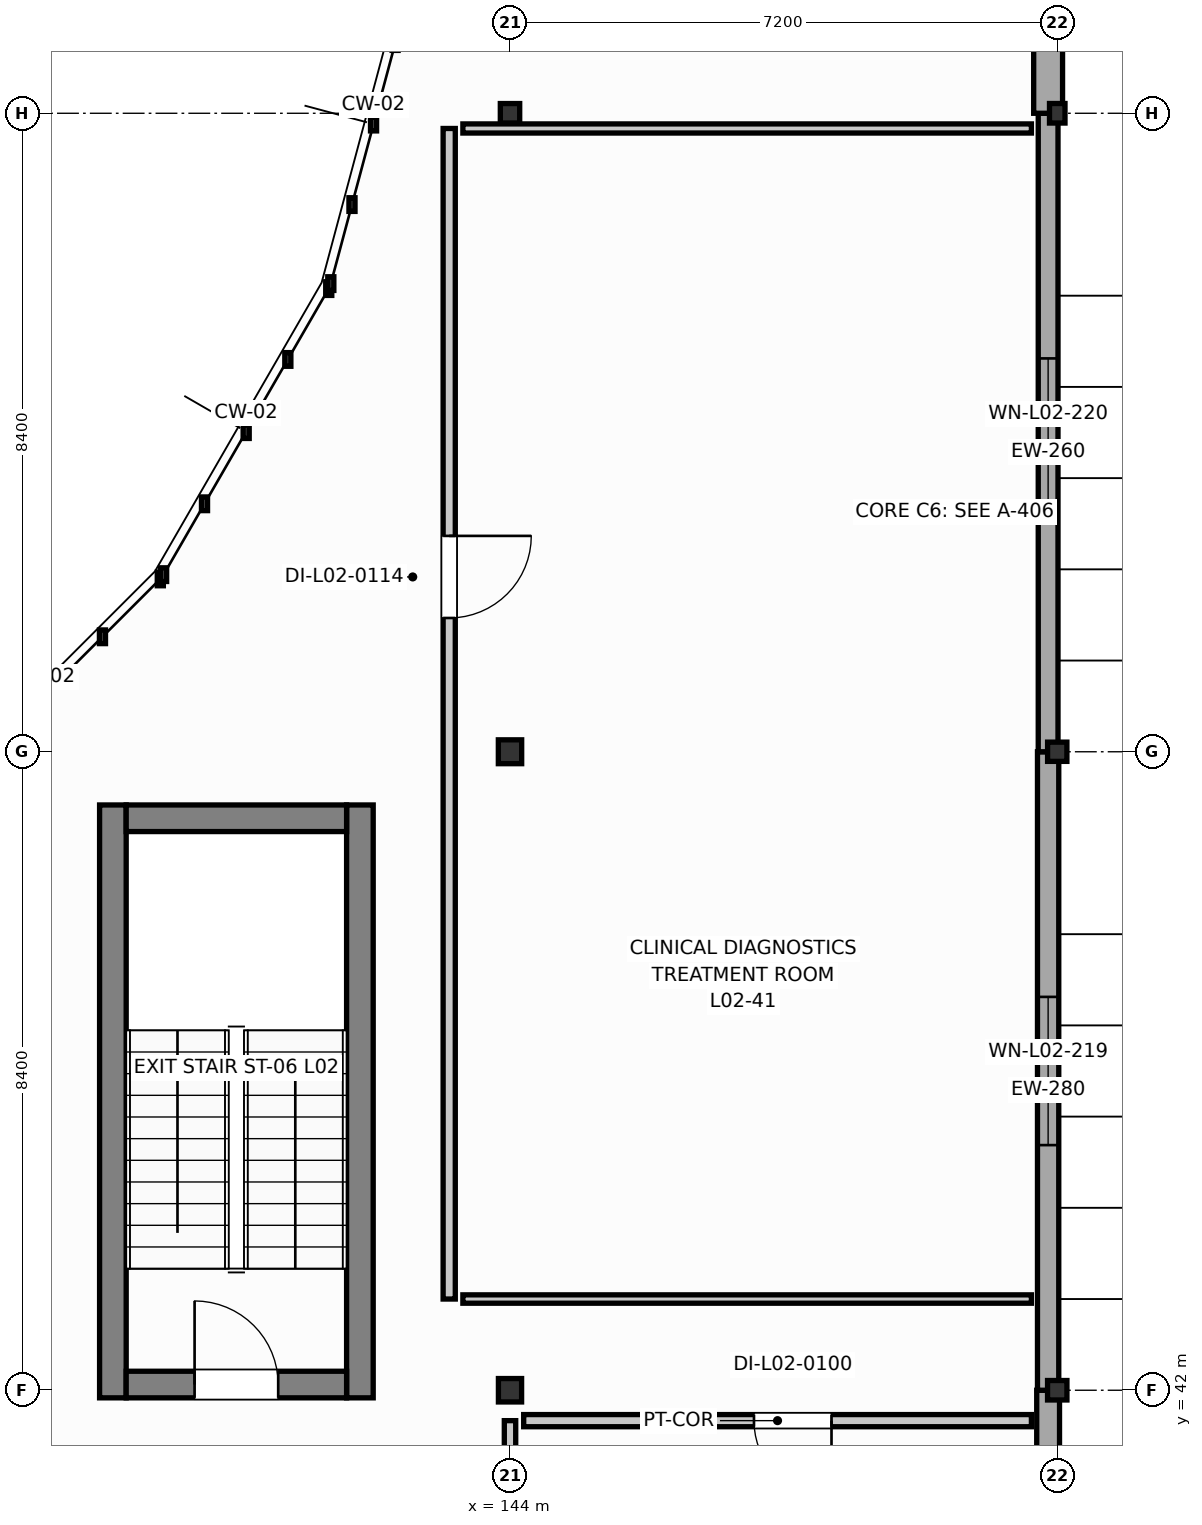
"""IFC4 building model, lengths in metres.
Left out: names, types, materials, properties, quantities, classifications, styles, units other than length and angle.
Written with IfcOpenShell. Run it as: python <this file> out.ifc"""

import sys

from ifc_helpers import new_model, si_unit, direction, frame, frame_2d, origin, origin_2d, place, context, subcontext, project, spatial, rectangle, i_section, extrude, element, fill, save


model = new_model("IFC4")
c1 = context("Model", 3, precision=1e-05, world=origin(), true_north=direction((0.0, 1.0)))
c2 = subcontext(c1, "Body", "Model", "MODEL_VIEW")
j1 = project(units=[si_unit("LENGTHUNIT", "METRE"), si_unit("PLANEANGLEUNIT", "RADIAN")], contexts=[c1])
p1 = place(None, origin())
s1 = spatial("IfcSite", under=j1, at=p1, CompositionType="ELEMENT")
p2 = place(p1, origin())
s2 = spatial("IfcBuilding", under=s1, at=p2, CompositionType="ELEMENT")
p3 = place(p2, frame((0.0, 0.0, 9.0)))
s3 = spatial("IfcBuildingStorey", under=s2, at=p3, CompositionType="ELEMENT", Elevation=9.0)
p4 = place(p3, frame((144.0, 42.0, 0.0), z_axis=(0.0, 0.0, 1.0), x_axis=(1.0, 0.0, 0.0)))
e1 = element("IfcColumn", 1, at=p4, inside=s3, PredefinedType="COLUMN", context=c2, shape_type="SweptSolid", body=[
    extrude(i_section(OverallWidth=0.305, OverallDepth=0.308, WebThickness=0.01, FlangeThickness=0.015, FilletRadius=0.015, at=origin_2d()), origin(), (0.0, 0.0, 1.0), 4.2),
])
p5 = place(p3, frame((144.0, 50.4, 0.0), z_axis=(0.0, 0.0, 1.0), x_axis=(1.0, 0.0, 0.0)))
e2 = element("IfcColumn", 2, at=p5, inside=s3, PredefinedType="COLUMN", context=c2, shape_type="SweptSolid", body=[
    extrude(i_section(OverallWidth=0.307, OverallDepth=0.314, WebThickness=0.012, FlangeThickness=0.019, FilletRadius=0.016, at=origin_2d()), origin(), (0.0, 0.0, 1.0), 4.2),
])
for number, where, z_axis, x_axis in (
    (3, (144.0, 58.8, 0.0), (0.0, 0.0, 1.0), (1.0, 0.0, 0.0)),
    (4, (151.2, 42.0, 0.0), (0.0, 0.0, 1.0), (1.0, 0.0, 0.0)),
):
    element("IfcColumn", number, at=place(p3, frame(where, z_axis=z_axis, x_axis=x_axis)), inside=s3, PredefinedType="COLUMN", context=c2, shape_type="SweptSolid", body=[
        extrude(i_section(OverallWidth=0.255, OverallDepth=0.256, WebThickness=0.01, FlangeThickness=0.016, FilletRadius=0.013, at=origin_2d()), origin(), (0.0, 0.0, 1.0), 4.2),
    ])
p6 = place(p3, frame((151.2, 50.4, 0.0), z_axis=(0.0, 0.0, 1.0), x_axis=(1.0, 0.0, 0.0)))
e5 = element("IfcColumn", 5, at=p6, inside=s3, PredefinedType="COLUMN", context=c2, shape_type="SweptSolid", body=[
    extrude(i_section(OverallWidth=0.254, OverallDepth=0.253, WebThickness=0.009, FlangeThickness=0.014, FilletRadius=0.013, at=origin_2d()), origin(), (0.0, 0.0, 1.0), 4.2),
])
p7 = place(p3, frame((151.2, 58.8, 0.0), z_axis=(0.0, 0.0, 1.0), x_axis=(1.0, 0.0, 0.0)))
e6 = element("IfcColumn", 6, at=p7, inside=s3, PredefinedType="COLUMN", context=c2, shape_type="SweptSolid", body=[
    extrude(i_section(OverallWidth=0.204, OverallDepth=0.257, WebThickness=0.009, FlangeThickness=0.016, FilletRadius=0.013, at=origin_2d()), origin(), (0.0, 0.0, 1.0), 4.2),
])
for number, where, z_axis, x_axis in (
    (7, (138.775, 41.9, 0.0), (0.0, 0.0, 1.0), (0.0, 1.0, 0.0)),
    (8, (142.025, 41.9, 0.0), (0.0, 0.0, 1.0), (0.0, 1.0, 0.0)),
):
    element("IfcWall", number, at=place(p3, frame(where, z_axis=z_axis, x_axis=x_axis)), inside=s3, PredefinedType="SHEAR", context=c2, shape_type="SweptSolid", body=[
        extrude(rectangle(XDim=7.8, YDim=0.35, at=frame_2d((3.9, 0.0))), origin(), (0.0, 0.0, 1.0), 3.99),
    ])
p8 = place(p3, frame((138.95, 49.525, 0.0), z_axis=(0.0, 0.0, 1.0), x_axis=(1.0, 0.0, 0.0)))
e9 = element("IfcWall", 9, at=p8, inside=s3, PredefinedType="SHEAR", context=c2, shape_type="SweptSolid", body=[
    extrude(rectangle(XDim=2.9, YDim=0.35, at=frame_2d((1.45, 0.0))), origin(), (0.0, 0.0, 1.0), 3.99),
])
p9 = place(p3, frame((138.95, 42.075, 0.0), z_axis=(0.0, 0.0, 1.0), x_axis=(1.0, 0.0, 0.0)))
e10 = element("IfcWall", 10, at=p9, inside=s3, PredefinedType="SHEAR", context=c2, shape_type="SweptSolid", body=[
    extrude(rectangle(XDim=2.9, YDim=0.35, at=frame_2d((1.45, 0.0))), origin(), (0.0, 0.0, 1.0), 3.99),
])
p10 = place(p9, frame((0.9, 0.0, 0.0)))
e11 = element("IfcOpeningElement", 11, at=p10, cuts=e10, PredefinedType="OPENING", context=c2, shape_type="SweptSolid", body=[
    extrude(rectangle(XDim=1.1, YDim=2.15, at=frame_2d((0.55, 1.075))), frame((0.0, 0.185, 0.0), z_axis=(0.0, -1.0, 0.0), x_axis=(1.0, 0.0, 0.0)), (0.0, 0.0, 1.0), 0.37),
])
p11 = place(p3, frame((151.08, 33.6, 0.0), z_axis=(0.0, 0.0, 1.0), x_axis=(0.0, 1.0, 0.0)))
e12 = element("IfcWall", 12, at=p11, inside=s3, PredefinedType="SOLIDWALL", context=c2, shape_type="SweptSolid", body=[
    extrude(rectangle(XDim=8.4, YDim=0.3, at=frame_2d((4.2, 0.0))), origin(), (0.0, 0.0, 1.0), 3.325),
])
p12 = place(p11, frame((3.225, 0.0, 0.95)))
e13 = element("IfcOpeningElement", 13, at=p12, cuts=e12, PredefinedType="OPENING", context=c2, shape_type="SweptSolid", body=[
    extrude(rectangle(XDim=1.95, YDim=1.35, at=frame_2d((0.975, 0.675))), frame((0.0, 0.16, 0.0), z_axis=(0.0, -1.0, 0.0), x_axis=(1.0, 0.0, 0.0)), (0.0, 0.0, 1.0), 0.32),
])
p13 = place(p3, frame((151.08, 42.0, 0.0), z_axis=(0.0, 0.0, 1.0), x_axis=(0.0, 1.0, 0.0)))
e14 = element("IfcWall", 14, at=p13, inside=s3, PredefinedType="SOLIDWALL", context=c2, shape_type="SweptSolid", body=[
    extrude(rectangle(XDim=8.4, YDim=0.28, at=frame_2d((4.2, 0.0))), origin(), (0.0, 0.0, 1.0), 3.325),
])
p14 = place(p13, frame((3.225, 0.0, 0.95)))
e15 = element("IfcOpeningElement", 15, at=p14, cuts=e14, PredefinedType="OPENING", context=c2, shape_type="SweptSolid", body=[
    extrude(rectangle(XDim=1.95, YDim=1.55, at=frame_2d((0.975, 0.775))), frame((0.0, 0.15, 0.0), z_axis=(0.0, -1.0, 0.0), x_axis=(1.0, 0.0, 0.0)), (0.0, 0.0, 1.0), 0.3),
])
p15 = place(p3, frame((151.08, 50.4, 0.0), z_axis=(0.0, 0.0, 1.0), x_axis=(0.0, 1.0, 0.0)))
e16 = element("IfcWall", 16, at=p15, inside=s3, PredefinedType="SOLIDWALL", context=c2, shape_type="SweptSolid", body=[
    extrude(rectangle(XDim=8.4, YDim=0.26, at=frame_2d((4.2, 0.0))), origin(), (0.0, 0.0, 1.0), 3.398),
])
p16 = place(p15, frame((3.225, 0.0, 0.95)))
e17 = element("IfcOpeningElement", 17, at=p16, cuts=e16, PredefinedType="OPENING", context=c2, shape_type="SweptSolid", body=[
    extrude(rectangle(XDim=1.95, YDim=1.75, at=frame_2d((0.975, 0.875))), frame((0.0, 0.14, 0.0), z_axis=(0.0, -1.0, 0.0), x_axis=(1.0, 0.0, 0.0)), (0.0, 0.0, 1.0), 0.28),
])
p17 = place(p3, frame((151.08, 58.8, 0.0), z_axis=(0.0, 0.0, 1.0), x_axis=(0.0, 1.0, 0.0)))
e18 = element("IfcWall", 18, at=p17, inside=s3, PredefinedType="SOLIDWALL", context=c2, shape_type="SweptSolid", body=[
    extrude(rectangle(XDim=8.4, YDim=0.38, at=frame_2d((4.2, 0.0))), origin(), (0.0, 0.0, 1.0), 3.405),
])
p18 = place(p17, frame((3.15, 0.0, 0.95)))
e19 = element("IfcOpeningElement", 19, at=p18, cuts=e18, PredefinedType="OPENING", context=c2, shape_type="SweptSolid", body=[
    extrude(rectangle(XDim=2.1, YDim=1.15, at=frame_2d((1.05, 0.575))), frame((0.0, 0.2, 0.0), z_axis=(0.0, -1.0, 0.0), x_axis=(1.0, 0.0, 0.0)), (0.0, 0.0, 1.0), 0.4),
])
p19 = place(p3, frame((144.0, 33.94, 0.0), z_axis=(0.0, 0.0, 1.0), x_axis=(0.0, 1.0, 0.0)))
e20 = element("IfcWall", 20, at=p19, inside=s3, PredefinedType="PLUMBINGWALL", context=c2, shape_type="SweptSolid", body=[
    extrude(rectangle(XDim=7.66, YDim=0.15, at=frame_2d((3.83, 0.0))), origin(), (0.0, 0.0, 1.0), 3.479),
])
p20 = place(p3, frame((144.18, 41.6, 0.0), z_axis=(0.0, 0.0, 1.0), x_axis=(1.0, 0.0, 0.0)))
e21 = element("IfcWall", 21, at=p20, inside=s3, PredefinedType="PARTITIONING", context=c2, shape_type="SweptSolid", body=[
    extrude(rectangle(XDim=6.68, YDim=0.16, at=frame_2d((3.34, 0.0))), origin(), (0.0, 0.0, 1.0), 3.479),
])
p21 = place(p20, frame((3.03, 0.0, 0.0)))
e22 = element("IfcOpeningElement", 22, at=p21, cuts=e21, PredefinedType="OPENING", context=c2, shape_type="SweptSolid", body=[
    extrude(rectangle(XDim=1.02, YDim=2.05, at=frame_2d((0.51, 1.025))), frame((0.0, 0.09, 0.0), z_axis=(0.0, -1.0, 0.0), x_axis=(1.0, 0.0, 0.0)), (0.0, 0.0, 1.0), 0.18),
])
p22 = place(p3, frame((143.2, 43.2, 0.0), z_axis=(0.0, 0.0, 1.0), x_axis=(0.0, 1.0, 0.0)))
e23 = element("IfcWall", 23, at=p22, inside=s3, PredefinedType="PARTITIONING", context=c2, shape_type="SweptSolid", body=[
    extrude(rectangle(XDim=15.4, YDim=0.16, at=frame_2d((7.7, 0.0))), origin(), (0.0, 0.0, 1.0), 3.945),
])
p23 = place(p22, frame((8.96, 0.0, 0.0)))
e24 = element("IfcOpeningElement", 24, at=p23, cuts=e23, PredefinedType="OPENING", context=c2, shape_type="SweptSolid", body=[
    extrude(rectangle(XDim=1.08, YDim=2.15, at=frame_2d((0.54, 1.075))), frame((0.0, 0.09, 0.0), z_axis=(0.0, -1.0, 0.0), x_axis=(1.0, 0.0, 0.0)), (0.0, 0.0, 1.0), 0.18),
])
p24 = place(p3, frame((143.38, 58.6, 0.0), z_axis=(0.0, 0.0, 1.0), x_axis=(1.0, 0.0, 0.0)))
e25 = element("IfcWall", 25, at=p24, inside=s3, PredefinedType="PARTITIONING", context=c2, shape_type="SweptSolid", body=[
    extrude(rectangle(XDim=7.48, YDim=0.12, at=frame_2d((3.74, 0.0))), origin(), (0.0, 0.0, 1.0), 3.485),
])
p25 = place(p3, frame((150.86, 43.2, 0.0), z_axis=(0.0, 0.0, 1.0), x_axis=(-1.0, 0.0, 0.0)))
e26 = element("IfcWall", 26, at=p25, inside=s3, PredefinedType="MOVABLE", context=c2, shape_type="SweptSolid", body=[
    extrude(rectangle(XDim=7.48, YDim=0.11, at=frame_2d((3.74, 0.0))), origin(), (0.0, 0.0, 1.0), 3.485),
])
p26 = place(p10, origin())
e27 = element("IfcDoor", 27, at=p26, inside=s3, OperationType="SINGLE_SWING_LEFT", PredefinedType="DOOR", context=c2, shape_type="SweptSolid", body=[
    extrude(rectangle(XDim=1.1, YDim=2.15, at=frame_2d((0.55, 1.075))), frame((0.0, 0.025, 0.0), z_axis=(0.0, -1.0, 0.0), x_axis=(1.0, 0.0, 0.0)), (0.0, 0.0, 1.0), 0.05),
])
fill(e11, e27)
p27 = place(p14, origin())
e28 = element("IfcWindow", 28, at=p27, inside=s3, PartitioningType="SINGLE_PANEL", PredefinedType="WINDOW", context=c2, shape_type="SweptSolid", body=[
    extrude(rectangle(XDim=1.95, YDim=1.55, at=frame_2d((0.975, 0.775))), frame((0.0, 0.03, 0.0), z_axis=(0.0, -1.0, 0.0), x_axis=(1.0, 0.0, 0.0)), (0.0, 0.0, 1.0), 0.06),
])
fill(e15, e28)
p28 = place(p16, origin())
e29 = element("IfcWindow", 29, at=p28, inside=s3, PartitioningType="SINGLE_PANEL", PredefinedType="WINDOW", context=c2, shape_type="SweptSolid", body=[
    extrude(rectangle(XDim=1.95, YDim=1.75, at=frame_2d((0.975, 0.875))), frame((0.0, 0.03, 0.0), z_axis=(0.0, -1.0, 0.0), x_axis=(1.0, 0.0, 0.0)), (0.0, 0.0, 1.0), 0.06),
])
fill(e17, e29)
p29 = place(p21, frame((1.02, 0.0, 0.0), z_axis=(0.0, 0.0, 1.0), x_axis=(-1.0, 0.0, 0.0)))
e30 = element("IfcDoor", 30, at=p29, inside=s3, OperationType="SINGLE_SWING_LEFT", PredefinedType="DOOR", context=c2, shape_type="SweptSolid", body=[
    extrude(rectangle(XDim=1.02, YDim=2.05, at=frame_2d((0.51, 1.025))), frame((0.0, 0.025, 0.0), z_axis=(0.0, -1.0, 0.0), x_axis=(1.0, 0.0, 0.0)), (0.0, 0.0, 1.0), 0.05),
])
fill(e22, e30)
p30 = place(p23, frame((1.08, 0.0, 0.0), z_axis=(0.0, 0.0, 1.0), x_axis=(-1.0, 0.0, 0.0)))
e31 = element("IfcDoor", 31, at=p30, inside=s3, OperationType="SINGLE_SWING_LEFT", PredefinedType="DOOR", context=c2, shape_type="SweptSolid", body=[
    extrude(rectangle(XDim=1.08, YDim=2.15, at=frame_2d((0.54, 1.075))), frame((0.0, 0.025, 0.0), z_axis=(0.0, -1.0, 0.0), x_axis=(1.0, 0.0, 0.0)), (0.0, 0.0, 1.0), 0.05),
])
fill(e24, e31)
save(model, sys.argv[1])
